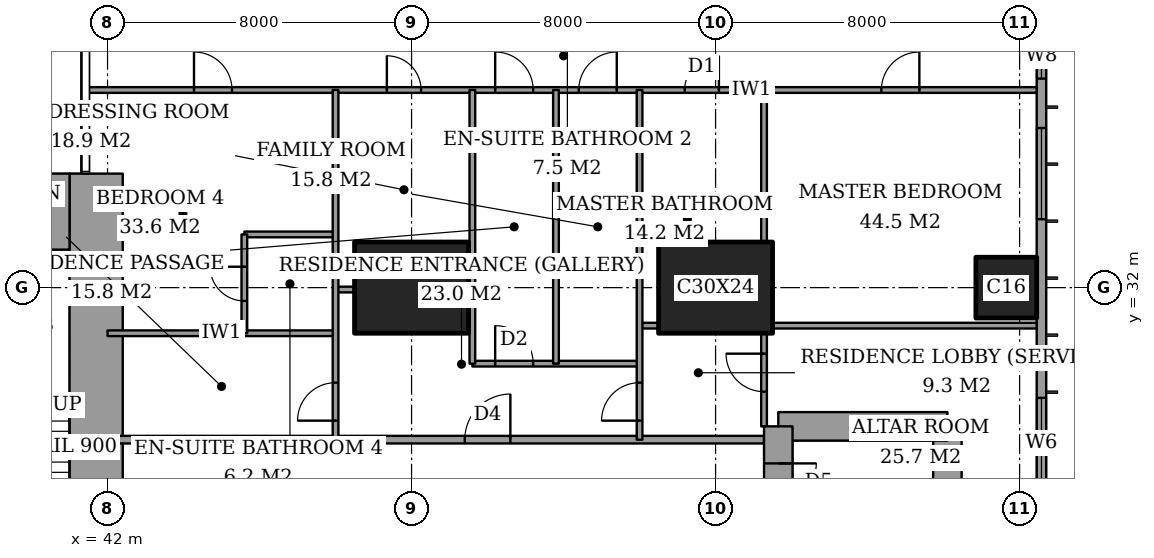
"""IFC4 building model, lengths in metres.
Left out: names, types, materials, properties, quantities, classifications, styles, units other than length and angle.
Written with IfcOpenShell. Run it as: python <this file> out.ifc"""

import sys

from ifc_helpers import new_model, si_unit, direction, frame, frame_2d, origin, origin_2d, place, context, subcontext, project, spatial, rectangle, extrude, element, fill, save


model = new_model("IFC4")
c1 = context("Model", 3, precision=1e-05, world=origin(), true_north=direction((0.0, 1.0)))
c2 = subcontext(c1, "Body", "Model", "MODEL_VIEW")
j1 = project(units=[si_unit("LENGTHUNIT", "METRE"), si_unit("PLANEANGLEUNIT", "RADIAN")], contexts=[c1])
p1 = place(None, origin())
s1 = spatial("IfcSite", under=j1, at=p1, CompositionType="ELEMENT")
p2 = place(p1, origin())
s2 = spatial("IfcBuilding", under=s1, at=p2, CompositionType="ELEMENT")
p3 = place(p2, frame((0.0, 0.0, 248.4)))
s3 = spatial("IfcBuildingStorey", under=s2, at=p3, CompositionType="ELEMENT", Elevation=248.4)
for number, where, z_axis, x_axis in (
    (1, (50.0, 32.0, 0.0), (0.0, 0.0, 1.0), (1.0, 0.0, 0.0)),
    (2, (58.0, 32.0, 0.0), (0.0, 0.0, 1.0), (1.0, 0.0, 0.0)),
):
    element("IfcColumn", number, at=place(p3, frame(where, z_axis=z_axis, x_axis=x_axis)), inside=s3, PredefinedType="COLUMN", context=c2, shape_type="SweptSolid", body=[
        extrude(rectangle(XDim=3.0, YDim=2.4, at=origin_2d()), origin(), (0.0, 0.0, 1.0), 3.6),
    ])
p4 = place(p3, frame((65.65, 32.0, 0.0), z_axis=(0.0, 0.0, 1.0), x_axis=(1.0, 0.0, 0.0)))
e3 = element("IfcColumn", 3, at=p4, inside=s3, PredefinedType="COLUMN", context=c2, shape_type="SweptSolid", body=[
    extrude(rectangle(XDim=1.6, YDim=1.6, at=origin_2d()), origin(), (0.0, 0.0, 1.0), 3.6),
])
p5 = place(p3, frame((37.85, 34.0, 0.0), z_axis=(0.0, 0.0, 1.0), x_axis=(1.0, 0.0, 0.0)))
e4 = element("IfcWall", 4, at=p5, inside=s3, PredefinedType="SHEAR", context=c2, shape_type="SweptSolid", body=[
    extrude(rectangle(XDim=3.15, YDim=2.0, at=frame_2d((1.575, 0.0))), origin(), (0.0, 0.0, 1.0), 3.6),
])
p6 = place(p3, frame((41.7, 24.85, 0.0), z_axis=(0.0, 0.0, 1.0), x_axis=(0.0, 1.0, 0.0)))
e5 = element("IfcWall", 5, at=p6, inside=s3, PredefinedType="SHEAR", context=c2, shape_type="SweptSolid", body=[
    extrude(rectangle(XDim=10.15, YDim=1.4, at=frame_2d((5.075, 0.0))), origin(), (0.0, 0.0, 1.0), 3.6),
])
p7 = place(p3, frame((64.1, 19.65, 0.0), z_axis=(0.0, 0.0, 1.0), x_axis=(0.0, 1.0, 0.0)))
e6 = element("IfcWall", 6, at=p7, inside=s3, PredefinedType="SHEAR", context=c2, shape_type="SweptSolid", body=[
    extrude(rectangle(XDim=8.7, YDim=0.75, at=frame_2d((4.35, 0.0))), origin(), (0.0, 0.0, 1.0), 3.6),
])
p8 = place(p3, frame((64.1, 28.35, 0.0), z_axis=(0.0, 0.0, 1.0), x_axis=(-1.0, 0.0, 0.0)))
e7 = element("IfcWall", 7, at=p8, inside=s3, PredefinedType="SHEAR", context=c2, shape_type="SweptSolid", body=[
    extrude(rectangle(XDim=4.45, YDim=0.75, at=frame_2d((2.225, 0.0))), origin(), (0.0, 0.0, 1.0), 3.6),
])
p9 = place(p3, frame((59.65, 28.35, 0.0), z_axis=(0.0, 0.0, 1.0), x_axis=(0.0, -1.0, 0.0)))
e8 = element("IfcWall", 8, at=p9, inside=s3, PredefinedType="SHEAR", context=c2, shape_type="SweptSolid", body=[
    extrude(rectangle(XDim=8.7, YDim=0.75, at=frame_2d((4.35, 0.0))), origin(), (0.0, 0.0, 1.0), 3.6),
])
p10 = place(p9, frame((0.975, 0.0, 0.0)))
e9 = element("IfcOpeningElement", 9, at=p10, cuts=e8, PredefinedType="OPENING", context=c2, shape_type="SweptSolid", body=[
    extrude(rectangle(XDim=1.0, YDim=2.1, at=frame_2d((0.5, 1.05))), frame((0.0, 0.385, 0.0), z_axis=(0.0, -1.0, 0.0), x_axis=(1.0, 0.0, 0.0)), (0.0, 0.0, 1.0), 0.77),
])
p11 = place(p3, frame((66.575, 3.175, 0.0), z_axis=(0.0, 0.0, 1.0), x_axis=(0.0, 1.0, 0.0)))
e10 = element("IfcWall", 10, at=p11, inside=s3, PredefinedType="SOLIDWALL", context=c2, shape_type="SweptSolid", body=[
    extrude(rectangle(XDim=41.65, YDim=0.25, at=frame_2d((20.825, 0.0))), origin(), (0.0, 0.0, 1.0), 3.6),
])
p12 = place(p11, frame((0.875, 0.0, 0.6)))
e11 = element("IfcOpeningElement", 11, at=p12, cuts=e10, PredefinedType="OPENING", context=c2, shape_type="SweptSolid", body=[
    extrude(rectangle(XDim=2.4, YDim=2.0, at=frame_2d((1.2, 1.0))), frame((0.0, 0.135, 0.0), z_axis=(0.0, -1.0, 0.0), x_axis=(1.0, 0.0, 0.0)), (0.0, 0.0, 1.0), 0.27),
])
p13 = place(p11, frame((6.0, 0.0, 0.6)))
e12 = element("IfcOpeningElement", 12, at=p13, cuts=e10, PredefinedType="OPENING", context=c2, shape_type="SweptSolid", body=[
    extrude(rectangle(XDim=1.2, YDim=2.0, at=frame_2d((0.6, 1.0))), frame((0.0, 0.135, 0.0), z_axis=(0.0, -1.0, 0.0), x_axis=(1.0, 0.0, 0.0)), (0.0, 0.0, 1.0), 0.27),
])
p14 = place(p11, frame((8.525, 0.0, 0.6)))
e13 = element("IfcOpeningElement", 13, at=p14, cuts=e10, PredefinedType="OPENING", context=c2, shape_type="SweptSolid", body=[
    extrude(rectangle(XDim=2.4, YDim=2.0, at=frame_2d((1.2, 1.0))), frame((0.0, 0.135, 0.0), z_axis=(0.0, -1.0, 0.0), x_axis=(1.0, 0.0, 0.0)), (0.0, 0.0, 1.0), 0.27),
])
p15 = place(p11, frame((15.725, 0.0, 0.6)))
e14 = element("IfcOpeningElement", 14, at=p15, cuts=e10, PredefinedType="OPENING", context=c2, shape_type="SweptSolid", body=[
    extrude(rectangle(XDim=2.4, YDim=2.0, at=frame_2d((1.2, 1.0))), frame((0.0, 0.135, 0.0), z_axis=(0.0, -1.0, 0.0), x_axis=(1.0, 0.0, 0.0)), (0.0, 0.0, 1.0), 0.27),
])
p16 = place(p11, frame((23.525, 0.0, 0.6)))
e15 = element("IfcOpeningElement", 15, at=p16, cuts=e10, PredefinedType="OPENING", context=c2, shape_type="SweptSolid", body=[
    extrude(rectangle(XDim=2.4, YDim=2.0, at=frame_2d((1.2, 1.0))), frame((0.0, 0.135, 0.0), z_axis=(0.0, -1.0, 0.0), x_axis=(1.0, 0.0, 0.0)), (0.0, 0.0, 1.0), 0.27),
])
p17 = place(p11, frame((30.625, 0.0, 0.6)))
e16 = element("IfcOpeningElement", 16, at=p17, cuts=e10, PredefinedType="OPENING", context=c2, shape_type="SweptSolid", body=[
    extrude(rectangle(XDim=2.4, YDim=2.0, at=frame_2d((1.2, 1.0))), frame((0.0, 0.135, 0.0), z_axis=(0.0, -1.0, 0.0), x_axis=(1.0, 0.0, 0.0)), (0.0, 0.0, 1.0), 0.27),
])
p18 = place(p11, frame((34.325, 0.0, 0.6)))
e17 = element("IfcOpeningElement", 17, at=p18, cuts=e10, PredefinedType="OPENING", context=c2, shape_type="SweptSolid", body=[
    extrude(rectangle(XDim=1.2, YDim=2.0, at=frame_2d((0.6, 1.0))), frame((0.0, 0.135, 0.0), z_axis=(0.0, -1.0, 0.0), x_axis=(1.0, 0.0, 0.0)), (0.0, 0.0, 1.0), 0.27),
])
p19 = place(p11, frame((38.375, 0.0, 0.6)))
e18 = element("IfcOpeningElement", 18, at=p19, cuts=e10, PredefinedType="OPENING", context=c2, shape_type="SweptSolid", body=[
    extrude(rectangle(XDim=2.4, YDim=2.0, at=frame_2d((1.2, 1.0))), frame((0.0, 0.135, 0.0), z_axis=(0.0, -1.0, 0.0), x_axis=(1.0, 0.0, 0.0)), (0.0, 0.0, 1.0), 0.27),
])
p20 = place(p3, frame((42.0, 28.0, 0.0), z_axis=(0.0, 0.0, 1.0), x_axis=(1.0, 0.0, 0.0)))
e19 = element("IfcWall", 19, at=p20, inside=s3, PredefinedType="PARTITIONING", context=c2, shape_type="SweptSolid", body=[
    extrude(rectangle(XDim=17.275, YDim=0.2, at=frame_2d((8.637, 0.0))), origin(), (0.0, 0.0, 1.0), 3.35),
])
p21 = place(p20, frame((9.4, 0.0, 0.0)))
e20 = element("IfcOpeningElement", 20, at=p21, cuts=e19, PredefinedType="OPENING", context=c2, shape_type="SweptSolid", body=[
    extrude(rectangle(XDim=1.2, YDim=2.4, at=frame_2d((0.6, 1.2))), frame((0.0, 0.11, 0.0), z_axis=(0.0, -1.0, 0.0), x_axis=(1.0, 0.0, 0.0)), (0.0, 0.0, 1.0), 0.22),
])
p22 = place(p3, frame((51.6, 30.0, 0.0), z_axis=(0.0, 0.0, 1.0), x_axis=(1.0, 0.0, 0.0)))
e21 = element("IfcWall", 21, at=p22, inside=s3, PredefinedType="PARTITIONING", context=c2, shape_type="SweptSolid", body=[
    extrude(rectangle(XDim=4.4, YDim=0.15, at=frame_2d((2.2, 0.0))), origin(), (0.0, 0.0, 1.0), 3.35),
])
p23 = place(p22, frame((0.6, 0.0, 0.0)))
e22 = element("IfcOpeningElement", 22, at=p23, cuts=e21, PredefinedType="OPENING", context=c2, shape_type="SweptSolid", body=[
    extrude(rectangle(XDim=1.0, YDim=2.1, at=frame_2d((0.5, 1.05))), frame((0.0, 0.085, 0.0), z_axis=(0.0, -1.0, 0.0), x_axis=(1.0, 0.0, 0.0)), (0.0, 0.0, 1.0), 0.17),
])
p24 = place(p3, frame((42.0, 30.8, 0.0), z_axis=(0.0, 0.0, 1.0), x_axis=(1.0, 0.0, 0.0)))
e23 = element("IfcWall", 23, at=p24, inside=s3, PredefinedType="PARTITIONING", context=c2, shape_type="SweptSolid", body=[
    extrude(rectangle(XDim=6.0, YDim=0.15, at=frame_2d((3.0, 0.0))), origin(), (0.0, 0.0, 1.0), 3.35),
])
p25 = place(p3, frame((56.0, 31.0, 0.0), z_axis=(0.0, 0.0, 1.0), x_axis=(1.0, 0.0, 0.0)))
e24 = element("IfcWall", 24, at=p25, inside=s3, PredefinedType="PARTITIONING", context=c2, shape_type="SweptSolid", body=[
    extrude(rectangle(XDim=0.5, YDim=0.15, at=frame_2d((0.25, 0.0))), origin(), (0.0, 0.0, 1.0), 3.35),
])
p26 = place(p3, frame((59.5, 31.0, 0.0), z_axis=(0.0, 0.0, 1.0), x_axis=(1.0, 0.0, 0.0)))
e25 = element("IfcWall", 25, at=p26, inside=s3, PredefinedType="PARTITIONING", context=c2, shape_type="SweptSolid", body=[
    extrude(rectangle(XDim=6.95, YDim=0.15, at=frame_2d((3.475, 0.0))), origin(), (0.0, 0.0, 1.0), 3.35),
])
p27 = place(p3, frame((48.0, 31.95, 0.0), z_axis=(0.0, 0.0, 1.0), x_axis=(1.0, 0.0, 0.0)))
e26 = element("IfcWall", 26, at=p27, inside=s3, PredefinedType="PARTITIONING", context=c2, shape_type="SweptSolid", body=[
    extrude(rectangle(XDim=0.5, YDim=0.15, at=frame_2d((0.25, 0.0))), origin(), (0.0, 0.0, 1.0), 2.634),
])
p28 = place(p3, frame((45.6, 33.4, 0.0), z_axis=(0.0, 0.0, 1.0), x_axis=(1.0, 0.0, 0.0)))
e27 = element("IfcWall", 27, at=p28, inside=s3, PredefinedType="PARTITIONING", context=c2, shape_type="SweptSolid", body=[
    extrude(rectangle(XDim=2.4, YDim=0.15, at=frame_2d((1.2, 0.0))), origin(), (0.0, 0.0, 1.0), 3.35),
])
p29 = place(p3, frame((41.439, 37.2, 0.0), z_axis=(0.0, 0.0, 1.0), x_axis=(1.0, 0.0, 0.0)))
e28 = element("IfcWall", 28, at=p29, inside=s3, PredefinedType="PARTITIONING", context=c2, shape_type="SweptSolid", body=[
    extrude(rectangle(XDim=25.011, YDim=0.15, at=frame_2d((12.505, 0.0))), origin(), (0.0, 0.0, 1.0), 3.35),
])
p30 = place(p29, frame((10.761, 0.0, 0.0)))
e29 = element("IfcOpeningElement", 29, at=p30, cuts=e28, PredefinedType="OPENING", context=c2, shape_type="SweptSolid", body=[
    extrude(rectangle(XDim=1.0, YDim=2.1, at=frame_2d((0.5, 1.05))), frame((0.0, 0.085, 0.0), z_axis=(0.0, -1.0, 0.0), x_axis=(1.0, 0.0, 0.0)), (0.0, 0.0, 1.0), 0.17),
])
p31 = place(p29, frame((20.924, 0.0, 0.0)))
e30 = element("IfcOpeningElement", 30, at=p31, cuts=e28, PredefinedType="OPENING", context=c2, shape_type="SweptSolid", body=[
    extrude(rectangle(XDim=1.0, YDim=2.1, at=frame_2d((0.5, 1.05))), frame((0.0, 0.085, 0.0), z_axis=(0.0, -1.0, 0.0), x_axis=(1.0, 0.0, 0.0)), (0.0, 0.0, 1.0), 0.17),
])
p32 = place(p29, frame((15.749, 0.0, 0.0)))
e31 = element("IfcOpeningElement", 31, at=p32, cuts=e28, PredefinedType="OPENING", context=c2, shape_type="SweptSolid", body=[
    extrude(rectangle(XDim=0.9, YDim=2.1, at=frame_2d((0.45, 1.05))), frame((0.0, 0.085, 0.0), z_axis=(0.0, -1.0, 0.0), x_axis=(1.0, 0.0, 0.0)), (0.0, 0.0, 1.0), 0.17),
])
p33 = place(p29, frame((12.961, 0.0, 0.0)))
e32 = element("IfcOpeningElement", 32, at=p33, cuts=e28, PredefinedType="OPENING", context=c2, shape_type="SweptSolid", body=[
    extrude(rectangle(XDim=1.0, YDim=2.1, at=frame_2d((0.5, 1.05))), frame((0.0, 0.085, 0.0), z_axis=(0.0, -1.0, 0.0), x_axis=(1.0, 0.0, 0.0)), (0.0, 0.0, 1.0), 0.17),
])
p34 = place(p29, frame((7.911, 0.0, 0.0)))
e33 = element("IfcOpeningElement", 33, at=p34, cuts=e28, PredefinedType="OPENING", context=c2, shape_type="SweptSolid", body=[
    extrude(rectangle(XDim=0.9, YDim=2.1, at=frame_2d((0.45, 1.05))), frame((0.0, 0.085, 0.0), z_axis=(0.0, -1.0, 0.0), x_axis=(1.0, 0.0, 0.0)), (0.0, 0.0, 1.0), 0.17),
])
p35 = place(p29, frame((2.836, 0.0, 0.0)))
e34 = element("IfcOpeningElement", 34, at=p35, cuts=e28, PredefinedType="OPENING", context=c2, shape_type="SweptSolid", body=[
    extrude(rectangle(XDim=1.0, YDim=2.1, at=frame_2d((0.5, 1.05))), frame((0.0, 0.085, 0.0), z_axis=(0.0, -1.0, 0.0), x_axis=(1.0, 0.0, 0.0)), (0.0, 0.0, 1.0), 0.17),
])
p36 = place(p3, frame((45.6, 30.8, 0.0), z_axis=(0.0, 0.0, 1.0), x_axis=(0.0, 1.0, 0.0)))
e35 = element("IfcWall", 35, at=p36, inside=s3, PredefinedType="PARTITIONING", context=c2, shape_type="SweptSolid", body=[
    extrude(rectangle(XDim=2.6, YDim=0.15, at=frame_2d((1.3, 0.0))), origin(), (0.0, 0.0, 1.0), 3.35),
])
p37 = place(p36, frame((0.85, 0.0, 0.0)))
e36 = element("IfcOpeningElement", 36, at=p37, cuts=e35, PredefinedType="OPENING", context=c2, shape_type="SweptSolid", body=[
    extrude(rectangle(XDim=0.9, YDim=2.1, at=frame_2d((0.45, 1.05))), frame((0.0, 0.085, 0.0), z_axis=(0.0, -1.0, 0.0), x_axis=(1.0, 0.0, 0.0)), (0.0, 0.0, 1.0), 0.17),
])
p38 = place(p3, frame((48.0, 28.0, 0.0), z_axis=(0.0, 0.0, 1.0), x_axis=(0.0, 1.0, 0.0)))
e37 = element("IfcWall", 37, at=p38, inside=s3, PredefinedType="PARTITIONING", context=c2, shape_type="SweptSolid", body=[
    extrude(rectangle(XDim=9.2, YDim=0.15, at=frame_2d((4.6, 0.0))), origin(), (0.0, 0.0, 1.0), 3.35),
])
p39 = place(p38, frame((0.5, 0.0, 0.0)))
e38 = element("IfcOpeningElement", 38, at=p39, cuts=e37, PredefinedType="OPENING", context=c2, shape_type="SweptSolid", body=[
    extrude(rectangle(XDim=1.0, YDim=2.1, at=frame_2d((0.5, 1.05))), frame((0.0, 0.085, 0.0), z_axis=(0.0, -1.0, 0.0), x_axis=(1.0, 0.0, 0.0)), (0.0, 0.0, 1.0), 0.17),
])
for number, where, z_axis, x_axis in (
    (39, (51.6, 30.0, 0.0), (0.0, 0.0, 1.0), (0.0, 1.0, 0.0)),
    (40, (53.8, 30.0, 0.0), (0.0, 0.0, 1.0), (0.0, 1.0, 0.0)),
):
    element("IfcWall", number, at=place(p3, frame(where, z_axis=z_axis, x_axis=x_axis)), inside=s3, PredefinedType="PARTITIONING", context=c2, shape_type="SweptSolid", body=[
        extrude(rectangle(XDim=7.2, YDim=0.15, at=frame_2d((3.6, 0.0))), origin(), (0.0, 0.0, 1.0), 3.35),
    ])
p40 = place(p3, frame((56.0, 28.0, 0.0), z_axis=(0.0, 0.0, 1.0), x_axis=(0.0, 1.0, 0.0)))
e41 = element("IfcWall", 41, at=p40, inside=s3, PredefinedType="PARTITIONING", context=c2, shape_type="SweptSolid", body=[
    extrude(rectangle(XDim=9.2, YDim=0.15, at=frame_2d((4.6, 0.0))), origin(), (0.0, 0.0, 1.0), 3.35),
])
p41 = place(p40, frame((0.5, 0.0, 0.0)))
e42 = element("IfcOpeningElement", 42, at=p41, cuts=e41, PredefinedType="OPENING", context=c2, shape_type="SweptSolid", body=[
    extrude(rectangle(XDim=1.0, YDim=2.1, at=frame_2d((0.5, 1.05))), frame((0.0, 0.085, 0.0), z_axis=(0.0, -1.0, 0.0), x_axis=(1.0, 0.0, 0.0)), (0.0, 0.0, 1.0), 0.17),
])
p42 = place(p3, frame((59.275, 28.35, 0.0), z_axis=(0.0, 0.0, 1.0), x_axis=(0.0, 1.0, 0.0)))
e43 = element("IfcWall", 43, at=p42, inside=s3, PredefinedType="PARTITIONING", context=c2, shape_type="SweptSolid", body=[
    extrude(rectangle(XDim=2.45, YDim=0.15, at=frame_2d((1.225, 0.0))), origin(), (0.0, 0.0, 1.0), 3.35),
])
p43 = place(p42, frame((0.913, 0.0, 0.0)))
e44 = element("IfcOpeningElement", 44, at=p43, cuts=e43, PredefinedType="OPENING", context=c2, shape_type="SweptSolid", body=[
    extrude(rectangle(XDim=1.0, YDim=2.1, at=frame_2d((0.5, 1.05))), frame((0.0, 0.085, 0.0), z_axis=(0.0, -1.0, 0.0), x_axis=(1.0, 0.0, 0.0)), (0.0, 0.0, 1.0), 0.17),
])
p44 = place(p3, frame((59.275, 33.2, 0.0), z_axis=(0.0, 0.0, 1.0), x_axis=(0.0, 1.0, 0.0)))
e45 = element("IfcWall", 45, at=p44, inside=s3, PredefinedType="PARTITIONING", context=c2, shape_type="SweptSolid", body=[
    extrude(rectangle(XDim=4.0, YDim=0.15, at=frame_2d((2.0, 0.0))), origin(), (0.0, 0.0, 1.0), 3.35),
])
p45 = place(p16, origin())
e46 = element("IfcWindow", 46, at=p45, inside=s3, PartitioningType="SINGLE_PANEL", PredefinedType="WINDOW", context=c2, shape_type="SweptSolid", body=[
    extrude(rectangle(XDim=2.4, YDim=2.0, at=frame_2d((1.2, 1.0))), frame((0.0, 0.03, 0.0), z_axis=(0.0, -1.0, 0.0), x_axis=(1.0, 0.0, 0.0)), (0.0, 0.0, 1.0), 0.06),
])
fill(e15, e46)
p46 = place(p17, origin())
e47 = element("IfcWindow", 47, at=p46, inside=s3, PartitioningType="SINGLE_PANEL", PredefinedType="WINDOW", context=c2, shape_type="SweptSolid", body=[
    extrude(rectangle(XDim=2.4, YDim=2.0, at=frame_2d((1.2, 1.0))), frame((0.0, 0.03, 0.0), z_axis=(0.0, -1.0, 0.0), x_axis=(1.0, 0.0, 0.0)), (0.0, 0.0, 1.0), 0.06),
])
fill(e16, e47)
p47 = place(p18, origin())
e48 = element("IfcWindow", 48, at=p47, inside=s3, PartitioningType="SINGLE_PANEL", PredefinedType="WINDOW", context=c2, shape_type="SweptSolid", body=[
    extrude(rectangle(XDim=1.2, YDim=2.0, at=frame_2d((0.6, 1.0))), frame((0.0, 0.03, 0.0), z_axis=(0.0, -1.0, 0.0), x_axis=(1.0, 0.0, 0.0)), (0.0, 0.0, 1.0), 0.06),
])
fill(e17, e48)
p48 = place(p30, origin())
e49 = element("IfcDoor", 49, at=p48, inside=s3, OperationType="SINGLE_SWING_RIGHT", PredefinedType="DOOR", context=c2, shape_type="SweptSolid", body=[
    extrude(rectangle(XDim=1.0, YDim=2.1, at=frame_2d((0.5, 1.05))), frame((0.0, 0.025, 0.0), z_axis=(0.0, -1.0, 0.0), x_axis=(1.0, 0.0, 0.0)), (0.0, 0.0, 1.0), 0.05),
])
fill(e29, e49)
p49 = place(p31, origin())
e50 = element("IfcDoor", 50, at=p49, inside=s3, OperationType="SINGLE_SWING_LEFT", PredefinedType="DOOR", context=c2, shape_type="SweptSolid", body=[
    extrude(rectangle(XDim=1.0, YDim=2.1, at=frame_2d((0.5, 1.05))), frame((0.0, 0.025, 0.0), z_axis=(0.0, -1.0, 0.0), x_axis=(1.0, 0.0, 0.0)), (0.0, 0.0, 1.0), 0.05),
])
fill(e30, e50)
p50 = place(p43, origin())
e51 = element("IfcDoor", 51, at=p50, inside=s3, OperationType="SINGLE_SWING_LEFT", PredefinedType="DOOR", context=c2, shape_type="SweptSolid", body=[
    extrude(rectangle(XDim=1.0, YDim=2.1, at=frame_2d((0.5, 1.05))), frame((0.0, 0.025, 0.0), z_axis=(0.0, -1.0, 0.0), x_axis=(1.0, 0.0, 0.0)), (0.0, 0.0, 1.0), 0.05),
])
fill(e44, e51)
p51 = place(p32, origin())
e52 = element("IfcDoor", 52, at=p51, inside=s3, OperationType="SINGLE_SWING_LEFT", PredefinedType="DOOR", context=c2, shape_type="SweptSolid", body=[
    extrude(rectangle(XDim=0.9, YDim=2.1, at=frame_2d((0.45, 1.05))), frame((0.0, 0.025, 0.0), z_axis=(0.0, -1.0, 0.0), x_axis=(1.0, 0.0, 0.0)), (0.0, 0.0, 1.0), 0.05),
])
fill(e31, e52)
p52 = place(p41, origin())
e53 = element("IfcDoor", 53, at=p52, inside=s3, OperationType="SINGLE_SWING_RIGHT", PredefinedType="DOOR", context=c2, shape_type="SweptSolid", body=[
    extrude(rectangle(XDim=1.0, YDim=2.1, at=frame_2d((0.5, 1.05))), frame((0.0, 0.025, 0.0), z_axis=(0.0, -1.0, 0.0), x_axis=(1.0, 0.0, 0.0)), (0.0, 0.0, 1.0), 0.05),
])
fill(e42, e53)
p53 = place(p21, origin())
e54 = element("IfcDoor", 54, at=p53, inside=s3, OperationType="SINGLE_SWING_LEFT", PredefinedType="DOOR", context=c2, shape_type="SweptSolid", body=[
    extrude(rectangle(XDim=1.2, YDim=2.4, at=frame_2d((0.6, 1.2))), frame((0.0, 0.025, 0.0), z_axis=(0.0, -1.0, 0.0), x_axis=(1.0, 0.0, 0.0)), (0.0, 0.0, 1.0), 0.05),
])
fill(e20, e54)
p54 = place(p33, origin())
e55 = element("IfcDoor", 55, at=p54, inside=s3, OperationType="SINGLE_SWING_LEFT", PredefinedType="DOOR", context=c2, shape_type="SweptSolid", body=[
    extrude(rectangle(XDim=1.0, YDim=2.1, at=frame_2d((0.5, 1.05))), frame((0.0, 0.025, 0.0), z_axis=(0.0, -1.0, 0.0), x_axis=(1.0, 0.0, 0.0)), (0.0, 0.0, 1.0), 0.05),
])
fill(e32, e55)
p55 = place(p23, origin())
e56 = element("IfcDoor", 56, at=p55, inside=s3, OperationType="SINGLE_SWING_RIGHT", PredefinedType="DOOR", context=c2, shape_type="SweptSolid", body=[
    extrude(rectangle(XDim=1.0, YDim=2.1, at=frame_2d((0.5, 1.05))), frame((0.0, 0.025, 0.0), z_axis=(0.0, -1.0, 0.0), x_axis=(1.0, 0.0, 0.0)), (0.0, 0.0, 1.0), 0.05),
])
fill(e22, e56)
p56 = place(p34, origin())
e57 = element("IfcDoor", 57, at=p56, inside=s3, OperationType="SINGLE_SWING_RIGHT", PredefinedType="DOOR", context=c2, shape_type="SweptSolid", body=[
    extrude(rectangle(XDim=0.9, YDim=2.1, at=frame_2d((0.45, 1.05))), frame((0.0, 0.025, 0.0), z_axis=(0.0, -1.0, 0.0), x_axis=(1.0, 0.0, 0.0)), (0.0, 0.0, 1.0), 0.05),
])
fill(e33, e57)
p57 = place(p37, origin())
e58 = element("IfcDoor", 58, at=p57, inside=s3, OperationType="SINGLE_SWING_LEFT", PredefinedType="DOOR", context=c2, shape_type="SweptSolid", body=[
    extrude(rectangle(XDim=0.9, YDim=2.1, at=frame_2d((0.45, 1.05))), frame((0.0, 0.025, 0.0), z_axis=(0.0, -1.0, 0.0), x_axis=(1.0, 0.0, 0.0)), (0.0, 0.0, 1.0), 0.05),
])
fill(e36, e58)
p58 = place(p35, origin())
e59 = element("IfcDoor", 59, at=p58, inside=s3, OperationType="SINGLE_SWING_RIGHT", PredefinedType="DOOR", context=c2, shape_type="SweptSolid", body=[
    extrude(rectangle(XDim=1.0, YDim=2.1, at=frame_2d((0.5, 1.05))), frame((0.0, 0.025, 0.0), z_axis=(0.0, -1.0, 0.0), x_axis=(1.0, 0.0, 0.0)), (0.0, 0.0, 1.0), 0.05),
])
fill(e34, e59)
p59 = place(p39, origin())
e60 = element("IfcDoor", 60, at=p59, inside=s3, OperationType="SINGLE_SWING_RIGHT", PredefinedType="DOOR", context=c2, shape_type="SweptSolid", body=[
    extrude(rectangle(XDim=1.0, YDim=2.1, at=frame_2d((0.5, 1.05))), frame((0.0, 0.025, 0.0), z_axis=(0.0, -1.0, 0.0), x_axis=(1.0, 0.0, 0.0)), (0.0, 0.0, 1.0), 0.05),
])
fill(e38, e60)
p60 = place(p10, origin())
e61 = element("IfcDoor", 61, at=p60, inside=s3, OperationType="SINGLE_SWING_RIGHT", PredefinedType="DOOR", context=c2, shape_type="SweptSolid", body=[
    extrude(rectangle(XDim=1.0, YDim=2.1, at=frame_2d((0.5, 1.05))), frame((0.0, 0.025, 0.0), z_axis=(0.0, -1.0, 0.0), x_axis=(1.0, 0.0, 0.0)), (0.0, 0.0, 1.0), 0.05),
])
fill(e9, e61)
save(model, sys.argv[1])
